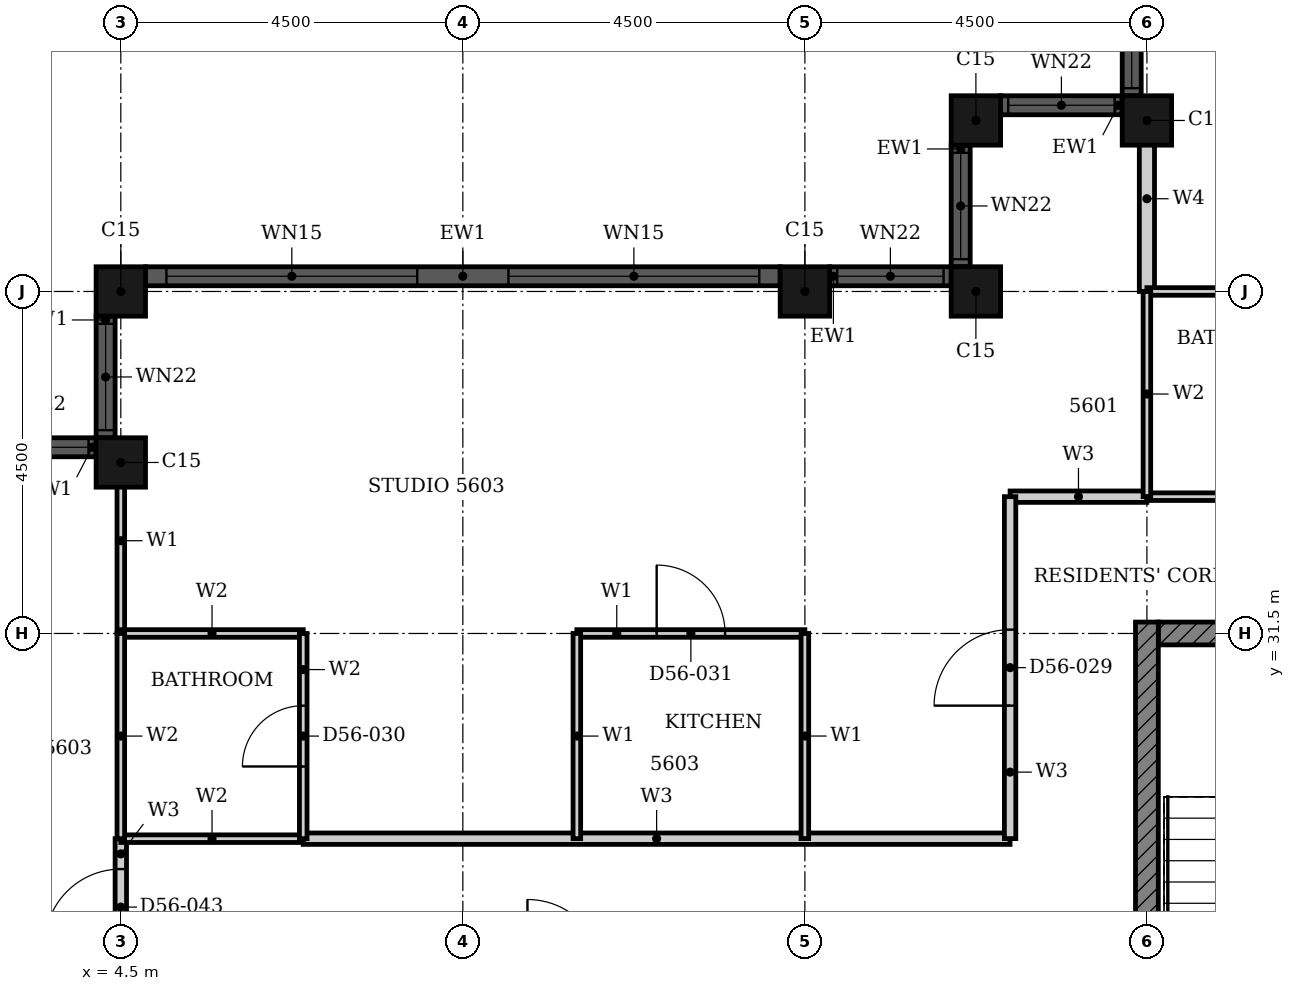
"""IFC4 building model, lengths in metres.
Left out: names, types, materials, properties, quantities, classifications, styles, units other than length and angle.
Written with IfcOpenShell. Run it as: python <this file> out.ifc"""

import sys

from ifc_helpers import new_model, si_unit, direction, frame, frame_2d, origin, origin_2d, place, context, subcontext, project, spatial, rectangle, hollow_rectangle, extrude, element, fill, save


model = new_model("IFC4")
c1 = context("Model", 3, precision=1e-05, world=origin(), true_north=direction((0.0, 1.0)))
c2 = subcontext(c1, "Body", "Model", "MODEL_VIEW")
j1 = project(units=[si_unit("LENGTHUNIT", "METRE"), si_unit("PLANEANGLEUNIT", "RADIAN")], contexts=[c1])
p1 = place(None, origin())
s1 = spatial("IfcSite", under=j1, at=p1, CompositionType="ELEMENT")
p2 = place(p1, origin())
s2 = spatial("IfcBuilding", under=s1, at=p2, CompositionType="ELEMENT")
p3 = place(p2, frame((0.0, 0.0, 222.0)))
s3 = spatial("IfcBuildingStorey", under=s2, at=p3, CompositionType="ELEMENT", Elevation=222.0)
for number, where, z_axis, x_axis in (
    (1, (18.0, 38.25, 0.0), (0.0, 0.0, 1.0), (1.0, 0.0, 0.0)),
    (2, (15.75, 38.25, 0.0), (0.0, 0.0, 1.0), (1.0, 0.0, 0.0)),
    (3, (15.75, 36.0, 0.0), (0.0, 0.0, 1.0), (1.0, 0.0, 0.0)),
    (4, (13.5, 36.0, 0.0), (0.0, 0.0, 1.0), (1.0, 0.0, 0.0)),
    (5, (4.5, 36.0, 0.0), (0.0, 0.0, 1.0), (1.0, 0.0, 0.0)),
    (6, (4.5, 33.75, 0.0), (0.0, 0.0, 1.0), (1.0, 0.0, 0.0)),
):
    element("IfcColumn", number, at=place(p3, frame(where, z_axis=z_axis, x_axis=x_axis)), inside=s3, PredefinedType="COLUMN", context=c2, shape_type="SweptSolid", body=[
        extrude(hollow_rectangle(XDim=0.65, YDim=0.65, WallThickness=0.021, at=origin_2d()), origin(), (0.0, 0.0, 1.0), 3.7),
    ])
p4 = place(p3, frame((17.8, 40.175, 0.0), z_axis=(0.0, 0.0, 1.0), x_axis=(0.0, -1.0, 0.0)))
e7 = element("IfcWall", 7, at=p4, inside=s3, PredefinedType="SOLIDWALL", context=c2, shape_type="SweptSolid", body=[
    extrude(rectangle(XDim=1.6, YDim=0.25, at=frame_2d((0.8, 0.0))), origin(), (0.0, 0.0, 1.0), 3.7),
])
p5 = place(p4, frame((0.1, 0.0, 0.9)))
e8 = element("IfcOpeningElement", 8, at=p5, cuts=e7, PredefinedType="OPENING", context=c2, shape_type="SweptSolid", body=[
    extrude(rectangle(XDim=1.4, YDim=1.85, at=frame_2d((0.7, 0.925))), frame((0.0, 0.135, 0.0), z_axis=(0.0, -1.0, 0.0), x_axis=(1.0, 0.0, 0.0)), (0.0, 0.0, 1.0), 0.27),
])
p6 = place(p3, frame((17.675, 38.45, 0.0), z_axis=(0.0, 0.0, 1.0), x_axis=(-1.0, 0.0, 0.0)))
e9 = element("IfcWall", 9, at=p6, inside=s3, PredefinedType="SOLIDWALL", context=c2, shape_type="SweptSolid", body=[
    extrude(rectangle(XDim=1.6, YDim=0.25, at=frame_2d((0.8, 0.0))), origin(), (0.0, 0.0, 1.0), 3.7),
])
p7 = place(p6, frame((0.1, 0.0, 0.9)))
e10 = element("IfcOpeningElement", 10, at=p7, cuts=e9, PredefinedType="OPENING", context=c2, shape_type="SweptSolid", body=[
    extrude(rectangle(XDim=1.4, YDim=1.85, at=frame_2d((0.7, 0.925))), frame((0.0, 0.135, 0.0), z_axis=(0.0, -1.0, 0.0), x_axis=(1.0, 0.0, 0.0)), (0.0, 0.0, 1.0), 0.27),
])
p8 = place(p3, frame((15.55, 37.925, 0.0), z_axis=(0.0, 0.0, 1.0), x_axis=(0.0, -1.0, 0.0)))
e11 = element("IfcWall", 11, at=p8, inside=s3, PredefinedType="SOLIDWALL", context=c2, shape_type="SweptSolid", body=[
    extrude(rectangle(XDim=1.6, YDim=0.25, at=frame_2d((0.8, 0.0))), origin(), (0.0, 0.0, 1.0), 3.7),
])
p9 = place(p8, frame((0.1, 0.0, 0.9)))
e12 = element("IfcOpeningElement", 12, at=p9, cuts=e11, PredefinedType="OPENING", context=c2, shape_type="SweptSolid", body=[
    extrude(rectangle(XDim=1.4, YDim=1.85, at=frame_2d((0.7, 0.925))), frame((0.0, 0.135, 0.0), z_axis=(0.0, -1.0, 0.0), x_axis=(1.0, 0.0, 0.0)), (0.0, 0.0, 1.0), 0.27),
])
p10 = place(p3, frame((15.425, 36.2, 0.0), z_axis=(0.0, 0.0, 1.0), x_axis=(-1.0, 0.0, 0.0)))
e13 = element("IfcWall", 13, at=p10, inside=s3, PredefinedType="SOLIDWALL", context=c2, shape_type="SweptSolid", body=[
    extrude(rectangle(XDim=1.6, YDim=0.25, at=frame_2d((0.8, 0.0))), origin(), (0.0, 0.0, 1.0), 3.7),
])
p11 = place(p10, frame((0.1, 0.0, 0.9)))
e14 = element("IfcOpeningElement", 14, at=p11, cuts=e13, PredefinedType="OPENING", context=c2, shape_type="SweptSolid", body=[
    extrude(rectangle(XDim=1.4, YDim=1.85, at=frame_2d((0.7, 0.925))), frame((0.0, 0.135, 0.0), z_axis=(0.0, -1.0, 0.0), x_axis=(1.0, 0.0, 0.0)), (0.0, 0.0, 1.0), 0.27),
])
p12 = place(p3, frame((13.175, 36.2, 0.0), z_axis=(0.0, 0.0, 1.0), x_axis=(-1.0, 0.0, 0.0)))
e15 = element("IfcWall", 15, at=p12, inside=s3, PredefinedType="SOLIDWALL", context=c2, shape_type="SweptSolid", body=[
    extrude(rectangle(XDim=8.35, YDim=0.25, at=frame_2d((4.175, 0.0))), origin(), (0.0, 0.0, 1.0), 3.7),
])
p13 = place(p12, frame((0.275, 0.0, 0.45)))
e16 = element("IfcOpeningElement", 16, at=p13, cuts=e15, PredefinedType="OPENING", context=c2, shape_type="SweptSolid", body=[
    extrude(rectangle(XDim=3.3, YDim=2.3, at=frame_2d((1.65, 1.15))), frame((0.0, 0.135, 0.0), z_axis=(0.0, -1.0, 0.0), x_axis=(1.0, 0.0, 0.0)), (0.0, 0.0, 1.0), 0.27),
])
p14 = place(p12, frame((4.775, 0.0, 0.45)))
e17 = element("IfcOpeningElement", 17, at=p14, cuts=e15, PredefinedType="OPENING", context=c2, shape_type="SweptSolid", body=[
    extrude(rectangle(XDim=3.3, YDim=2.3, at=frame_2d((1.65, 1.15))), frame((0.0, 0.135, 0.0), z_axis=(0.0, -1.0, 0.0), x_axis=(1.0, 0.0, 0.0)), (0.0, 0.0, 1.0), 0.27),
])
p15 = place(p3, frame((4.3, 35.675, 0.0), z_axis=(0.0, 0.0, 1.0), x_axis=(0.0, -1.0, 0.0)))
e18 = element("IfcWall", 18, at=p15, inside=s3, PredefinedType="SOLIDWALL", context=c2, shape_type="SweptSolid", body=[
    extrude(rectangle(XDim=1.6, YDim=0.25, at=frame_2d((0.8, 0.0))), origin(), (0.0, 0.0, 1.0), 3.7),
])
p16 = place(p15, frame((0.1, 0.0, 0.9)))
e19 = element("IfcOpeningElement", 19, at=p16, cuts=e18, PredefinedType="OPENING", context=c2, shape_type="SweptSolid", body=[
    extrude(rectangle(XDim=1.4, YDim=1.85, at=frame_2d((0.7, 0.925))), frame((0.0, 0.135, 0.0), z_axis=(0.0, -1.0, 0.0), x_axis=(1.0, 0.0, 0.0)), (0.0, 0.0, 1.0), 0.27),
])
p17 = place(p3, frame((4.175, 33.95, 0.0), z_axis=(0.0, 0.0, 1.0), x_axis=(-1.0, 0.0, 0.0)))
e20 = element("IfcWall", 20, at=p17, inside=s3, PredefinedType="SOLIDWALL", context=c2, shape_type="SweptSolid", body=[
    extrude(rectangle(XDim=1.6, YDim=0.25, at=frame_2d((0.8, 0.0))), origin(), (0.0, 0.0, 1.0), 3.7),
])
p18 = place(p17, frame((0.1, 0.0, 0.9)))
e21 = element("IfcOpeningElement", 21, at=p18, cuts=e20, PredefinedType="OPENING", context=c2, shape_type="SweptSolid", body=[
    extrude(rectangle(XDim=1.4, YDim=1.85, at=frame_2d((0.7, 0.925))), frame((0.0, 0.135, 0.0), z_axis=(0.0, -1.0, 0.0), x_axis=(1.0, 0.0, 0.0)), (0.0, 0.0, 1.0), 0.27),
])
p19 = place(p3, frame((18.15, 31.5, 0.0), z_axis=(0.0, 0.0, 1.0), x_axis=(1.0, 0.0, 0.0)))
e22 = element("IfcWall", 22, at=p19, inside=s3, PredefinedType="SHEAR", context=c2, shape_type="SweptSolid", body=[
    extrude(rectangle(XDim=9.368, YDim=0.3, at=frame_2d((4.684, 0.0))), origin(), (0.0, 0.0, 1.0), 3.4),
])
p20 = place(p19, frame((4.736, 0.0, 0.0)))
e23 = element("IfcOpeningElement", 23, at=p20, cuts=e22, PredefinedType="OPENING", context=c2, shape_type="SweptSolid", body=[
    extrude(rectangle(XDim=1.8, YDim=2.1, at=frame_2d((0.9, 1.05))), frame((0.0, 0.16, 0.0), z_axis=(0.0, -1.0, 0.0), x_axis=(1.0, 0.0, 0.0)), (0.0, 0.0, 1.0), 0.32),
])
p21 = place(p3, frame((18.0, 22.35, 0.0), z_axis=(0.0, 0.0, 1.0), x_axis=(0.0, 1.0, 0.0)))
e24 = element("IfcWall", 24, at=p21, inside=s3, PredefinedType="SHEAR", context=c2, shape_type="SweptSolid", body=[
    extrude(rectangle(XDim=9.3, YDim=0.3, at=frame_2d((4.65, 0.0))), origin(), (0.0, 0.0, 1.0), 3.4),
])
p22 = place(p3, frame((6.9, 28.8, 0.0), z_axis=(0.0, 0.0, 1.0), x_axis=(1.0, 0.0, 0.0)))
e25 = element("IfcWall", 25, at=p22, inside=s3, PredefinedType="PARTITIONING", context=c2, shape_type="SweptSolid", body=[
    extrude(rectangle(XDim=9.299, YDim=0.15, at=frame_2d((4.649, 0.0))), origin(), (0.0, 0.0, 1.0), 3.4),
])
p23 = place(p3, frame((16.2, 33.3, 0.0), z_axis=(0.0, 0.0, 1.0), x_axis=(1.0, 0.0, 0.0)))
e26 = element("IfcWall", 26, at=p23, inside=s3, PredefinedType="PARTITIONING", context=c2, shape_type="SweptSolid", body=[
    extrude(rectangle(XDim=1.799, YDim=0.15, at=frame_2d((0.899, 0.0))), origin(), (0.0, 0.0, 1.0), 3.4),
])
p24 = place(p3, frame((16.2, 28.801, 0.0), z_axis=(0.0, 0.0, 1.0), x_axis=(0.0, 1.0, 0.0)))
e27 = element("IfcWall", 27, at=p24, inside=s3, PredefinedType="PARTITIONING", context=c2, shape_type="SweptSolid", body=[
    extrude(rectangle(XDim=4.499, YDim=0.15, at=frame_2d((2.25, 0.0))), origin(), (0.0, 0.0, 1.0), 3.4),
])
p25 = place(p24, frame((1.75, 0.0, 0.0)))
e28 = element("IfcOpeningElement", 28, at=p25, cuts=e27, PredefinedType="OPENING", context=c2, shape_type="SweptSolid", body=[
    extrude(rectangle(XDim=1.0, YDim=2.2, at=frame_2d((0.5, 1.1))), frame((0.0, 0.085, 0.0), z_axis=(0.0, -1.0, 0.0), x_axis=(1.0, 0.0, 0.0)), (0.0, 0.0, 1.0), 0.17),
])
p26 = place(p3, frame((4.5, 27.0, 0.0), z_axis=(0.0, 0.0, 1.0), x_axis=(0.0, 1.0, 0.0)))
e29 = element("IfcWall", 29, at=p26, inside=s3, PredefinedType="PARTITIONING", context=c2, shape_type="SweptSolid", body=[
    extrude(rectangle(XDim=1.8, YDim=0.15, at=frame_2d((0.9, 0.0))), origin(), (0.0, 0.0, 1.0), 3.4),
])
p27 = place(p26, frame((0.4, 0.0, 0.0)))
e30 = element("IfcOpeningElement", 30, at=p27, cuts=e29, PredefinedType="OPENING", context=c2, shape_type="SweptSolid", body=[
    extrude(rectangle(XDim=1.0, YDim=2.1, at=frame_2d((0.5, 1.05))), frame((0.0, 0.085, 0.0), z_axis=(0.0, -1.0, 0.0), x_axis=(1.0, 0.0, 0.0)), (0.0, 0.0, 1.0), 0.17),
])
p28 = place(p3, frame((10.5, 31.5, 0.0), z_axis=(0.0, 0.0, 1.0), x_axis=(1.0, 0.0, 0.0)))
e31 = element("IfcWall", 31, at=p28, inside=s3, PredefinedType="PARTITIONING", context=c2, shape_type="SweptSolid", body=[
    extrude(rectangle(XDim=3.0, YDim=0.1, at=frame_2d((1.5, 0.0))), origin(), (0.0, 0.0, 1.0), 2.68),
])
p29 = place(p28, frame((1.05, 0.0, 0.0)))
e32 = element("IfcOpeningElement", 32, at=p29, cuts=e31, PredefinedType="OPENING", context=c2, shape_type="SweptSolid", body=[
    extrude(rectangle(XDim=0.9, YDim=2.1, at=frame_2d((0.45, 1.05))), frame((0.0, 0.06, 0.0), z_axis=(0.0, -1.0, 0.0), x_axis=(1.0, 0.0, 0.0)), (0.0, 0.0, 1.0), 0.12),
])
p30 = place(p3, frame((10.5, 28.8, 0.0), z_axis=(0.0, 0.0, 1.0), x_axis=(0.0, 1.0, 0.0)))
e33 = element("IfcWall", 33, at=p30, inside=s3, PredefinedType="PARTITIONING", context=c2, shape_type="SweptSolid", body=[
    extrude(rectangle(XDim=2.7, YDim=0.1, at=frame_2d((1.35, 0.0))), origin(), (0.0, 0.0, 1.0), 3.4),
])
p31 = place(p3, frame((13.5, 28.801, 0.0), z_axis=(0.0, 0.0, 1.0), x_axis=(0.0, 1.0, 0.0)))
e34 = element("IfcWall", 34, at=p31, inside=s3, PredefinedType="PARTITIONING", context=c2, shape_type="SweptSolid", body=[
    extrude(rectangle(XDim=2.699, YDim=0.1, at=frame_2d((1.35, 0.0))), origin(), (0.0, 0.0, 1.0), 2.48),
])
p32 = place(p3, frame((4.5, 31.501, 0.0), z_axis=(0.0, 0.0, 1.0), x_axis=(0.0, 1.0, 0.0)))
e35 = element("IfcWall", 35, at=p32, inside=s3, PredefinedType="PARTITIONING", context=c2, shape_type="SweptSolid", body=[
    extrude(rectangle(XDim=2.439, YDim=0.1, at=frame_2d((1.219, 0.0))), origin(), (0.0, 0.0, 1.0), 3.4),
])
p33 = place(p3, frame((18.0, 36.0, 0.0), z_axis=(0.0, 0.0, 1.0), x_axis=(0.0, 1.0, 0.0)))
e36 = element("IfcWall", 36, at=p33, inside=s3, PredefinedType="PARTITIONING", context=c2, shape_type="SweptSolid", body=[
    extrude(rectangle(XDim=2.44, YDim=0.2, at=frame_2d((1.22, 0.0))), origin(), (0.0, 0.0, 1.0), 3.4),
])
p34 = place(p3, frame((4.5, 28.8, 0.0), z_axis=(0.0, 0.0, 1.0), x_axis=(1.0, 0.0, 0.0)))
e37 = element("IfcWall", 37, at=p34, inside=s3, PredefinedType="PARTITIONING", context=c2, shape_type="SweptSolid", body=[
    extrude(rectangle(XDim=2.4, YDim=0.1, at=frame_2d((1.2, 0.0))), origin(), (0.0, 0.0, 1.0), 3.4),
])
p35 = place(p3, frame((4.5, 31.5, 0.0), z_axis=(0.0, 0.0, 1.0), x_axis=(1.0, 0.0, 0.0)))
e38 = element("IfcWall", 38, at=p35, inside=s3, PredefinedType="PARTITIONING", context=c2, shape_type="SweptSolid", body=[
    extrude(rectangle(XDim=2.4, YDim=0.1, at=frame_2d((1.2, 0.0))), origin(), (0.0, 0.0, 1.0), 2.68),
])
for number, where, z_axis, x_axis in (
    (39, (18.0, 33.3, 0.0), (0.0, 0.0, 1.0), (1.0, 0.0, 0.0)),
    (40, (18.0, 36.0, 0.0), (0.0, 0.0, 1.0), (1.0, 0.0, 0.0)),
):
    element("IfcWall", number, at=place(p3, frame(where, z_axis=z_axis, x_axis=x_axis)), inside=s3, PredefinedType="PARTITIONING", context=c2, shape_type="SweptSolid", body=[
        extrude(rectangle(XDim=2.4, YDim=0.1, at=frame_2d((1.2, 0.0))), origin(), (0.0, 0.0, 1.0), 3.4),
    ])
p36 = place(p3, frame((18.0, 33.301, 0.0), z_axis=(0.0, 0.0, 1.0), x_axis=(0.0, 1.0, 0.0)))
e41 = element("IfcWall", 41, at=p36, inside=s3, PredefinedType="PARTITIONING", context=c2, shape_type="SweptSolid", body=[
    extrude(rectangle(XDim=2.699, YDim=0.1, at=frame_2d((1.35, 0.0))), origin(), (0.0, 0.0, 1.0), 3.4),
])
p37 = place(p3, frame((4.5, 28.8, 0.0), z_axis=(0.0, 0.0, 1.0), x_axis=(0.0, 1.0, 0.0)))
e42 = element("IfcWall", 42, at=p37, inside=s3, PredefinedType="PARTITIONING", context=c2, shape_type="SweptSolid", body=[
    extrude(rectangle(XDim=2.7, YDim=0.1, at=frame_2d((1.35, 0.0))), origin(), (0.0, 0.0, 1.0), 3.4),
])
p38 = place(p3, frame((6.9, 28.8, 0.0), z_axis=(0.0, 0.0, 1.0), x_axis=(0.0, 1.0, 0.0)))
e43 = element("IfcWall", 43, at=p38, inside=s3, PredefinedType="PARTITIONING", context=c2, shape_type="SweptSolid", body=[
    extrude(rectangle(XDim=2.7, YDim=0.1, at=frame_2d((1.35, 0.0))), origin(), (0.0, 0.0, 1.0), 3.4),
])
p39 = place(p38, frame((0.95, 0.0, 0.0)))
e44 = element("IfcOpeningElement", 44, at=p39, cuts=e43, PredefinedType="OPENING", context=c2, shape_type="SweptSolid", body=[
    extrude(rectangle(XDim=0.8, YDim=2.1, at=frame_2d((0.4, 1.05))), frame((0.0, 0.06, 0.0), z_axis=(0.0, -1.0, 0.0), x_axis=(1.0, 0.0, 0.0)), (0.0, 0.0, 1.0), 0.12),
])
p40 = place(p5, origin())
e45 = element("IfcWindow", 45, at=p40, inside=s3, PartitioningType="SINGLE_PANEL", PredefinedType="WINDOW", context=c2, shape_type="SweptSolid", body=[
    extrude(rectangle(XDim=1.4, YDim=1.85, at=frame_2d((0.7, 0.925))), frame((0.0, 0.03, 0.0), z_axis=(0.0, -1.0, 0.0), x_axis=(1.0, 0.0, 0.0)), (0.0, 0.0, 1.0), 0.06),
])
fill(e8, e45)
p41 = place(p7, origin())
e46 = element("IfcWindow", 46, at=p41, inside=s3, PartitioningType="SINGLE_PANEL", PredefinedType="WINDOW", context=c2, shape_type="SweptSolid", body=[
    extrude(rectangle(XDim=1.4, YDim=1.85, at=frame_2d((0.7, 0.925))), frame((0.0, 0.03, 0.0), z_axis=(0.0, -1.0, 0.0), x_axis=(1.0, 0.0, 0.0)), (0.0, 0.0, 1.0), 0.06),
])
fill(e10, e46)
p42 = place(p9, origin())
e47 = element("IfcWindow", 47, at=p42, inside=s3, PartitioningType="SINGLE_PANEL", PredefinedType="WINDOW", context=c2, shape_type="SweptSolid", body=[
    extrude(rectangle(XDim=1.4, YDim=1.85, at=frame_2d((0.7, 0.925))), frame((0.0, 0.03, 0.0), z_axis=(0.0, -1.0, 0.0), x_axis=(1.0, 0.0, 0.0)), (0.0, 0.0, 1.0), 0.06),
])
fill(e12, e47)
p43 = place(p11, origin())
e48 = element("IfcWindow", 48, at=p43, inside=s3, PartitioningType="SINGLE_PANEL", PredefinedType="WINDOW", context=c2, shape_type="SweptSolid", body=[
    extrude(rectangle(XDim=1.4, YDim=1.85, at=frame_2d((0.7, 0.925))), frame((0.0, 0.03, 0.0), z_axis=(0.0, -1.0, 0.0), x_axis=(1.0, 0.0, 0.0)), (0.0, 0.0, 1.0), 0.06),
])
fill(e14, e48)
p44 = place(p13, origin())
e49 = element("IfcWindow", 49, at=p44, inside=s3, PartitioningType="SINGLE_PANEL", PredefinedType="WINDOW", context=c2, shape_type="SweptSolid", body=[
    extrude(rectangle(XDim=3.3, YDim=2.3, at=frame_2d((1.65, 1.15))), frame((0.0, 0.03, 0.0), z_axis=(0.0, -1.0, 0.0), x_axis=(1.0, 0.0, 0.0)), (0.0, 0.0, 1.0), 0.06),
])
fill(e16, e49)
p45 = place(p14, origin())
e50 = element("IfcWindow", 50, at=p45, inside=s3, PartitioningType="SINGLE_PANEL", PredefinedType="WINDOW", context=c2, shape_type="SweptSolid", body=[
    extrude(rectangle(XDim=3.3, YDim=2.3, at=frame_2d((1.65, 1.15))), frame((0.0, 0.03, 0.0), z_axis=(0.0, -1.0, 0.0), x_axis=(1.0, 0.0, 0.0)), (0.0, 0.0, 1.0), 0.06),
])
fill(e17, e50)
p46 = place(p16, origin())
e51 = element("IfcWindow", 51, at=p46, inside=s3, PartitioningType="SINGLE_PANEL", PredefinedType="WINDOW", context=c2, shape_type="SweptSolid", body=[
    extrude(rectangle(XDim=1.4, YDim=1.85, at=frame_2d((0.7, 0.925))), frame((0.0, 0.03, 0.0), z_axis=(0.0, -1.0, 0.0), x_axis=(1.0, 0.0, 0.0)), (0.0, 0.0, 1.0), 0.06),
])
fill(e19, e51)
p47 = place(p18, origin())
e52 = element("IfcWindow", 52, at=p47, inside=s3, PartitioningType="SINGLE_PANEL", PredefinedType="WINDOW", context=c2, shape_type="SweptSolid", body=[
    extrude(rectangle(XDim=1.4, YDim=1.85, at=frame_2d((0.7, 0.925))), frame((0.0, 0.03, 0.0), z_axis=(0.0, -1.0, 0.0), x_axis=(1.0, 0.0, 0.0)), (0.0, 0.0, 1.0), 0.06),
])
fill(e21, e52)
p48 = place(p25, origin())
e53 = element("IfcDoor", 53, at=p48, inside=s3, OperationType="SINGLE_SWING_RIGHT", PredefinedType="DOOR", context=c2, shape_type="SweptSolid", body=[
    extrude(rectangle(XDim=1.0, YDim=2.2, at=frame_2d((0.5, 1.1))), frame((0.0, 0.025, 0.0), z_axis=(0.0, -1.0, 0.0), x_axis=(1.0, 0.0, 0.0)), (0.0, 0.0, 1.0), 0.05),
])
fill(e28, e53)
p49 = place(p39, origin())
e54 = element("IfcDoor", 54, at=p49, inside=s3, OperationType="SINGLE_SWING_RIGHT", PredefinedType="DOOR", context=c2, shape_type="SweptSolid", body=[
    extrude(rectangle(XDim=0.8, YDim=2.1, at=frame_2d((0.4, 1.05))), frame((0.0, 0.025, 0.0), z_axis=(0.0, -1.0, 0.0), x_axis=(1.0, 0.0, 0.0)), (0.0, 0.0, 1.0), 0.05),
])
fill(e44, e54)
p50 = place(p29, origin())
e55 = element("IfcDoor", 55, at=p50, inside=s3, OperationType="SINGLE_SWING_RIGHT", PredefinedType="DOOR", context=c2, shape_type="SweptSolid", body=[
    extrude(rectangle(XDim=0.9, YDim=2.1, at=frame_2d((0.45, 1.05))), frame((0.0, 0.025, 0.0), z_axis=(0.0, -1.0, 0.0), x_axis=(1.0, 0.0, 0.0)), (0.0, 0.0, 1.0), 0.05),
])
fill(e32, e55)
p51 = place(p27, origin())
e56 = element("IfcDoor", 56, at=p51, inside=s3, OperationType="SINGLE_SWING_LEFT", PredefinedType="DOOR", context=c2, shape_type="SweptSolid", body=[
    extrude(rectangle(XDim=1.0, YDim=2.1, at=frame_2d((0.5, 1.05))), frame((0.0, 0.025, 0.0), z_axis=(0.0, -1.0, 0.0), x_axis=(1.0, 0.0, 0.0)), (0.0, 0.0, 1.0), 0.05),
])
fill(e30, e56)
save(model, sys.argv[1])
